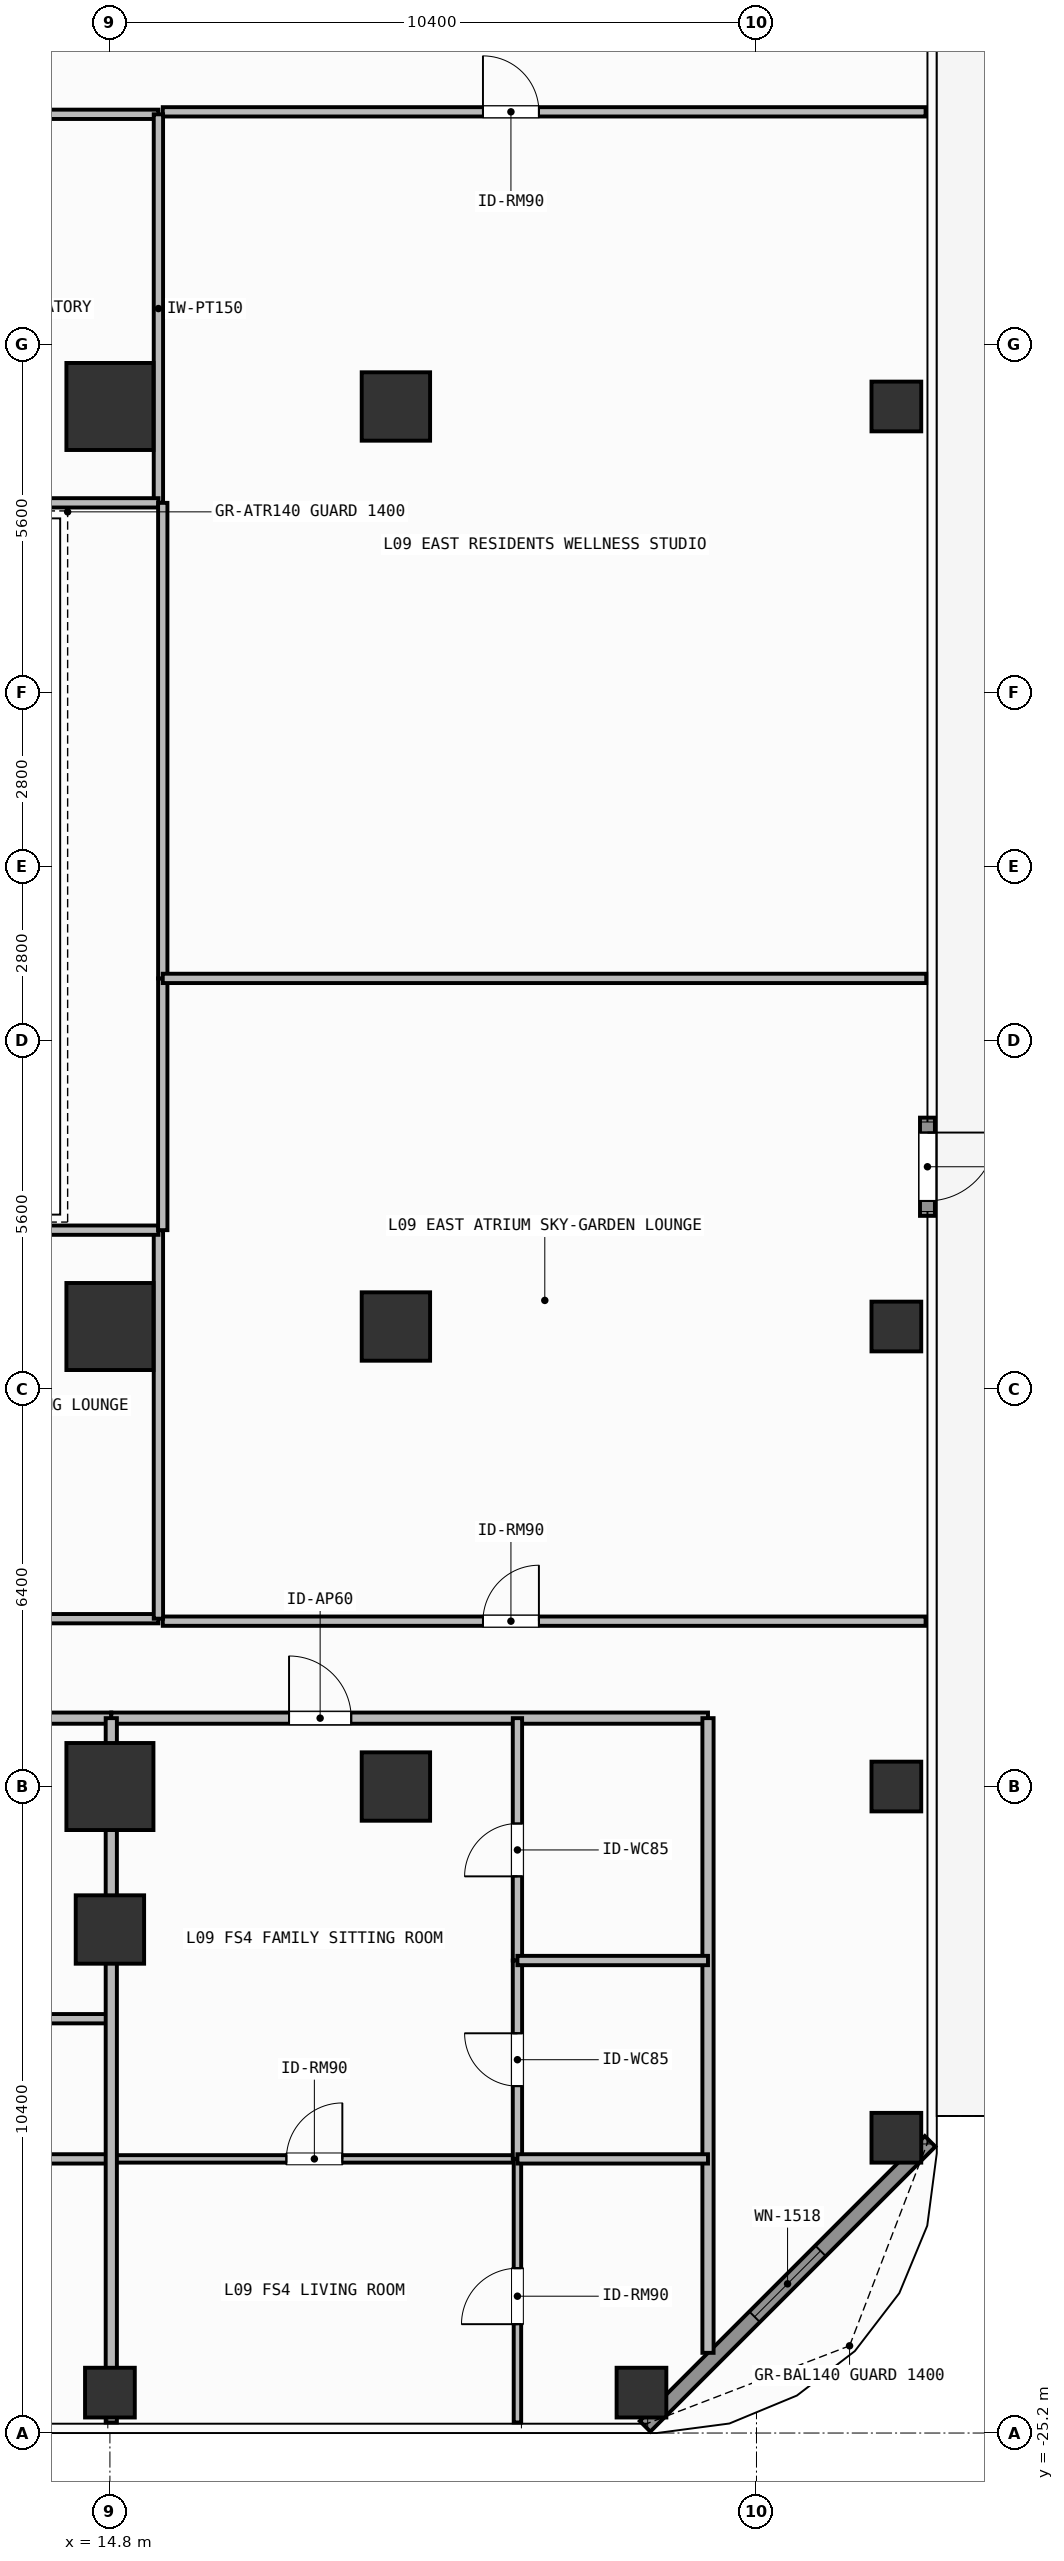
"""IFC4 building model, lengths in metres.
Left out: names, types, materials, properties, quantities, classifications, styles, units other than length and angle.
Written with IfcOpenShell. Run it as: python <this file> out.ifc"""

import sys

from ifc_helpers import new_model, si_unit, direction, frame, frame_2d, origin, origin_2d, place, context, subcontext, project, spatial, rectangle, hollow_rectangle, extrude, element, fill, save


model = new_model("IFC4")
c1 = context("Model", 3, precision=1e-05, world=origin(), true_north=direction((0.0, 1.0)))
c2 = subcontext(c1, "Body", "Model", "MODEL_VIEW")
j1 = project(units=[si_unit("LENGTHUNIT", "METRE"), si_unit("PLANEANGLEUNIT", "RADIAN")], contexts=[c1])
p1 = place(None, origin())
s1 = spatial("IfcSite", under=j1, at=p1, CompositionType="ELEMENT")
p2 = place(p1, origin())
s2 = spatial("IfcBuilding", under=s1, at=p2, CompositionType="ELEMENT")
p3 = place(p2, frame((0.0, 0.0, 34.5)))
s3 = spatial("IfcBuildingStorey", under=s2, at=p3, CompositionType="ELEMENT", Elevation=34.5)
for number, where, z_axis, x_axis in (
    (1, (14.8, -14.8, 0.0), (0.0, 0.0, 1.0), (1.0, 0.0, 0.0)),
    (2, (14.8, -7.4, 0.0), (0.0, 0.0, 1.0), (1.0, 0.0, 0.0)),
    (3, (14.8, 7.4, 0.0), (0.0, 0.0, 1.0), (1.0, 0.0, 0.0)),
):
    element("IfcColumn", number, at=place(p3, frame(where, z_axis=z_axis, x_axis=x_axis)), inside=s3, PredefinedType="COLUMN", context=c2, shape_type="SweptSolid", body=[
        extrude(rectangle(XDim=1.4, YDim=1.4, at=origin_2d()), origin(), (0.0, 0.0, 1.0), 3.9),
    ])
for number, where, z_axis, x_axis in (
    (4, (19.4, -14.8, 0.0), (0.0, 0.0, 1.0), (1.0, 0.0, 0.0)),
    (5, (19.4, -7.4, 0.0), (0.0, 0.0, 1.0), (1.0, 0.0, 0.0)),
    (6, (19.4, 7.4, 0.0), (0.0, 0.0, 1.0), (1.0, 0.0, 0.0)),
    (7, (14.8, -17.1, 0.0), (0.0, 0.0, 1.0), (1.0, 0.0, 0.0)),
):
    element("IfcColumn", number, at=place(p3, frame(where, z_axis=z_axis, x_axis=x_axis)), inside=s3, PredefinedType="COLUMN", context=c2, shape_type="SweptSolid", body=[
        extrude(rectangle(XDim=1.1, YDim=1.1, at=origin_2d()), origin(), (0.0, 0.0, 1.0), 3.9),
    ])
for number, where, z_axis, x_axis in (
    (8, (23.35, -24.55, 0.0), (0.0, 0.0, 1.0), (1.0, 0.0, 0.0)),
    (9, (27.45, -20.45, 0.0), (0.0, 0.0, 1.0), (1.0, 0.0, 0.0)),
    (10, (14.8, -24.55, 0.0), (0.0, 0.0, 1.0), (1.0, 0.0, 0.0)),
    (11, (27.45, -14.8, 0.0), (0.0, 0.0, 1.0), (1.0, 0.0, 0.0)),
    (12, (27.45, -7.4, 0.0), (0.0, 0.0, 1.0), (1.0, 0.0, 0.0)),
    (13, (27.45, 7.4, 0.0), (0.0, 0.0, 1.0), (1.0, 0.0, 0.0)),
):
    element("IfcColumn", number, at=place(p3, frame(where, z_axis=z_axis, x_axis=x_axis)), inside=s3, PredefinedType="COLUMN", context=c2, shape_type="SweptSolid", body=[
        extrude(hollow_rectangle(XDim=0.8, YDim=0.8, WallThickness=0.036, at=origin_2d()), origin(), (0.0, 0.0, 1.0), 3.9),
    ])
p4 = place(p3, frame((27.95, -4.04, 0.0), z_axis=(0.0, 0.0, 1.0), x_axis=(0.0, -1.0, 0.0)))
e14 = element("IfcWall", 14, at=p4, inside=s3, PredefinedType="SOLIDWALL", context=c2, shape_type="SweptSolid", body=[
    extrude(rectangle(XDim=1.58, YDim=0.24, at=frame_2d((0.79, 0.0))), origin(), (0.0, 0.0, 1.0), 3.68),
])
p5 = place(p4, frame((0.24, 0.0, 0.0)))
e15 = element("IfcOpeningElement", 15, at=p5, cuts=e14, PredefinedType="OPENING", context=c2, shape_type="SweptSolid", body=[
    extrude(rectangle(XDim=1.1, YDim=2.2, at=frame_2d((0.55, 1.1))), frame((0.0, 0.13, 0.0), z_axis=(0.0, -1.0, 0.0), x_axis=(1.0, 0.0, 0.0)), (0.0, 0.0, 1.0), 0.26),
])
p6 = place(p3, frame((27.992, -20.508, 0.0), z_axis=(0.0, 0.0, 1.0), x_axis=(-0.707106781187, -0.707106781187, 0.0)))
e16 = element("IfcWall", 16, at=p6, inside=s3, PredefinedType="SOLIDWALL", context=c2, shape_type="SweptSolid", body=[
    extrude(rectangle(XDim=6.484, YDim=0.24, at=frame_2d((3.242, 0.0))), origin(), (0.0, 0.0, 1.0), 3.68),
])
p7 = place(p6, frame((2.492, 0.0, 0.8)))
e17 = element("IfcOpeningElement", 17, at=p7, cuts=e16, PredefinedType="OPENING", context=c2, shape_type="SweptSolid", body=[
    extrude(rectangle(XDim=1.5, YDim=1.85, at=frame_2d((0.75, 0.925))), frame((0.0, 0.13, 0.0), z_axis=(0.0, -1.0, 0.0), x_axis=(1.0, 0.0, 0.0)), (0.0, 0.0, 1.0), 0.26),
])
p8 = place(p3, frame((10.1, -12.1, 0.0), z_axis=(0.0, 0.0, 1.0), x_axis=(1.0, 0.0, 0.0)))
e18 = element("IfcWall", 18, at=p8, inside=s3, PredefinedType="PARTITIONING", context=c2, shape_type="SweptSolid", body=[
    extrude(rectangle(XDim=5.48, YDim=0.15, at=frame_2d((2.74, 0.0))), origin(), (0.0, 0.0, 1.0), 3.68),
])
p9 = place(p8, frame((2.29, 0.0, 0.0)))
e19 = element("IfcOpeningElement", 19, at=p9, cuts=e18, PredefinedType="OPENING", context=c2, shape_type="SweptSolid", body=[
    extrude(rectangle(XDim=0.9, YDim=2.1, at=frame_2d((0.45, 1.05))), frame((0.0, 0.085, 0.0), z_axis=(0.0, -1.0, 0.0), x_axis=(1.0, 0.0, 0.0)), (0.0, 0.0, 1.0), 0.17),
])
p10 = place(p3, frame((8.36, 12.1, 0.0), z_axis=(0.0, 0.0, 1.0), x_axis=(1.0, 0.0, 0.0)))
e20 = element("IfcWall", 20, at=p10, inside=s3, PredefinedType="PARTITIONING", context=c2, shape_type="SweptSolid", body=[
    extrude(rectangle(XDim=7.22, YDim=0.15, at=frame_2d((3.61, 0.0))), origin(), (0.0, 0.0, 1.0), 3.68),
])
p11 = place(p10, frame((3.513, 0.0, 0.0)))
e21 = element("IfcOpeningElement", 21, at=p11, cuts=e20, PredefinedType="OPENING", context=c2, shape_type="SweptSolid", body=[
    extrude(rectangle(XDim=0.9, YDim=2.1, at=frame_2d((0.45, 1.05))), frame((0.0, 0.085, 0.0), z_axis=(0.0, -1.0, 0.0), x_axis=(1.0, 0.0, 0.0)), (0.0, 0.0, 1.0), 0.17),
])
p12 = place(p3, frame((2.9, -13.7, 0.0), z_axis=(0.0, 0.0, 1.0), x_axis=(1.0, 0.0, 0.0)))
e22 = element("IfcWall", 22, at=p12, inside=s3, PredefinedType="PARTITIONING", context=c2, shape_type="SweptSolid", body=[
    extrude(rectangle(XDim=11.922, YDim=0.18, at=frame_2d((5.961, 0.0))), origin(), (0.0, 0.0, 1.0), 3.68),
])
p13 = place(p12, frame((5.371, 0.0, 0.0)))
e23 = element("IfcOpeningElement", 23, at=p13, cuts=e22, PredefinedType="OPENING", context=c2, shape_type="SweptSolid", body=[
    extrude(rectangle(XDim=1.0, YDim=2.2, at=frame_2d((0.5, 1.1))), frame((0.0, 0.1, 0.0), z_axis=(0.0, -1.0, 0.0), x_axis=(1.0, 0.0, 0.0)), (0.0, 0.0, 1.0), 0.2),
])
p14 = place(p3, frame((14.822, -13.7, 0.0), z_axis=(0.0, 0.0, 1.0), x_axis=(1.0, 0.0, 0.0)))
e24 = element("IfcWall", 24, at=p14, inside=s3, PredefinedType="PARTITIONING", context=c2, shape_type="SweptSolid", body=[
    extrude(rectangle(XDim=9.598, YDim=0.18, at=frame_2d((4.799, 0.0))), origin(), (0.0, 0.0, 1.0), 3.68),
])
p15 = place(p14, frame((2.859, 0.0, 0.0)))
e25 = element("IfcOpeningElement", 25, at=p15, cuts=e24, PredefinedType="OPENING", context=c2, shape_type="SweptSolid", body=[
    extrude(rectangle(XDim=1.0, YDim=2.2, at=frame_2d((0.5, 1.1))), frame((0.0, 0.1, 0.0), z_axis=(0.0, -1.0, 0.0), x_axis=(1.0, 0.0, 0.0)), (0.0, 0.0, 1.0), 0.2),
])
p16 = place(p3, frame((14.822, -20.79, 0.0), z_axis=(0.0, 0.0, 1.0), x_axis=(1.0, 0.0, 0.0)))
e26 = element("IfcWall", 26, at=p16, inside=s3, PredefinedType="PARTITIONING", context=c2, shape_type="SweptSolid", body=[
    extrude(rectangle(XDim=6.533, YDim=0.12, at=frame_2d((3.267, 0.0))), origin(), (0.0, 0.0, 1.0), 3.68),
])
p17 = place(p16, frame((2.816, 0.0, 0.0)))
e27 = element("IfcOpeningElement", 27, at=p17, cuts=e26, PredefinedType="OPENING", context=c2, shape_type="SweptSolid", body=[
    extrude(rectangle(XDim=0.9, YDim=2.1, at=frame_2d((0.45, 1.05))), frame((0.0, 0.07, 0.0), z_axis=(0.0, -1.0, 0.0), x_axis=(1.0, 0.0, 0.0)), (0.0, 0.0, 1.0), 0.14),
])
p18 = place(p3, frame((21.355, -17.599, 0.0), z_axis=(0.0, 0.0, 1.0), x_axis=(0.0, 1.0, 0.0)))
e28 = element("IfcWall", 28, at=p18, inside=s3, PredefinedType="PARTITIONING", context=c2, shape_type="SweptSolid", body=[
    extrude(rectangle(XDim=3.899, YDim=0.15, at=frame_2d((1.95, 0.0))), origin(), (0.0, 0.0, 1.0), 3.68),
])
p19 = place(p18, frame((1.354, 0.0, 0.0)))
e29 = element("IfcOpeningElement", 29, at=p19, cuts=e28, PredefinedType="OPENING", context=c2, shape_type="SweptSolid", body=[
    extrude(rectangle(XDim=0.85, YDim=2.1, at=frame_2d((0.425, 1.05))), frame((0.0, 0.085, 0.0), z_axis=(0.0, -1.0, 0.0), x_axis=(1.0, 0.0, 0.0)), (0.0, 0.0, 1.0), 0.17),
])
p20 = place(p3, frame((21.355, -20.79, 0.0), z_axis=(0.0, 0.0, 1.0), x_axis=(0.0, 1.0, 0.0)))
e30 = element("IfcWall", 30, at=p20, inside=s3, PredefinedType="PARTITIONING", context=c2, shape_type="SweptSolid", body=[
    extrude(rectangle(XDim=3.191, YDim=0.15, at=frame_2d((1.595, 0.0))), origin(), (0.0, 0.0, 1.0), 3.68),
])
p21 = place(p20, frame((1.17, 0.0, 0.0)))
e31 = element("IfcOpeningElement", 31, at=p21, cuts=e30, PredefinedType="OPENING", context=c2, shape_type="SweptSolid", body=[
    extrude(rectangle(XDim=0.85, YDim=2.1, at=frame_2d((0.425, 1.05))), frame((0.0, 0.085, 0.0), z_axis=(0.0, -1.0, 0.0), x_axis=(1.0, 0.0, 0.0)), (0.0, 0.0, 1.0), 0.17),
])
p22 = place(p3, frame((21.355, -25.03, 0.0), z_axis=(0.0, 0.0, 1.0), x_axis=(0.0, 1.0, 0.0)))
e32 = element("IfcWall", 32, at=p22, inside=s3, PredefinedType="PARTITIONING", context=c2, shape_type="SweptSolid", body=[
    extrude(rectangle(XDim=4.24, YDim=0.12, at=frame_2d((2.12, 0.0))), origin(), (0.0, 0.0, 1.0), 3.68),
])
p23 = place(p22, frame((1.581, 0.0, 0.0)))
e33 = element("IfcOpeningElement", 33, at=p23, cuts=e32, PredefinedType="OPENING", context=c2, shape_type="SweptSolid", body=[
    extrude(rectangle(XDim=0.9, YDim=2.1, at=frame_2d((0.45, 1.05))), frame((0.0, 0.07, 0.0), z_axis=(0.0, -1.0, 0.0), x_axis=(1.0, 0.0, 0.0)), (0.0, 0.0, 1.0), 0.14),
])
p24 = place(p3, frame((15.65, -12.14, 0.0), z_axis=(0.0, 0.0, 1.0), x_axis=(1.0, 0.0, 0.0)))
e34 = element("IfcWall", 34, at=p24, inside=s3, PredefinedType="PARTITIONING", context=c2, shape_type="SweptSolid", body=[
    extrude(rectangle(XDim=12.27, YDim=0.15, at=frame_2d((6.135, 0.0))), origin(), (0.0, 0.0, 1.0), 3.68),
])
p25 = place(p24, frame((5.15, 0.0, 0.0)))
e35 = element("IfcOpeningElement", 35, at=p25, cuts=e34, PredefinedType="OPENING", context=c2, shape_type="SweptSolid", body=[
    extrude(rectangle(XDim=0.9, YDim=2.1, at=frame_2d((0.45, 1.05))), frame((0.0, 0.085, 0.0), z_axis=(0.0, -1.0, 0.0), x_axis=(1.0, 0.0, 0.0)), (0.0, 0.0, 1.0), 0.17),
])
p26 = place(p3, frame((15.65, 12.14, 0.0), z_axis=(0.0, 0.0, 1.0), x_axis=(1.0, 0.0, 0.0)))
e36 = element("IfcWall", 36, at=p26, inside=s3, PredefinedType="PARTITIONING", context=c2, shape_type="SweptSolid", body=[
    extrude(rectangle(XDim=12.27, YDim=0.15, at=frame_2d((6.135, 0.0))), origin(), (0.0, 0.0, 1.0), 3.68),
])
p27 = place(p26, frame((5.15, 0.0, 0.0)))
e37 = element("IfcOpeningElement", 37, at=p27, cuts=e36, PredefinedType="OPENING", context=c2, shape_type="SweptSolid", body=[
    extrude(rectangle(XDim=0.9, YDim=2.1, at=frame_2d((0.45, 1.05))), frame((0.0, 0.085, 0.0), z_axis=(0.0, -1.0, 0.0), x_axis=(1.0, 0.0, 0.0)), (0.0, 0.0, 1.0), 0.17),
])
p28 = place(p3, frame((15.58, -12.1, 0.0), z_axis=(0.0, 0.0, 1.0), x_axis=(0.0, 1.0, 0.0)))
e38 = element("IfcWall", 38, at=p28, inside=s3, PredefinedType="PARTITIONING", context=c2, shape_type="SweptSolid", body=[
    extrude(rectangle(XDim=6.25, YDim=0.15, at=frame_2d((3.125, 0.0))), origin(), (0.0, 0.0, 1.0), 3.68),
])
p29 = place(p3, frame((8.96, -5.85, 0.0), z_axis=(0.0, 0.0, 1.0), x_axis=(1.0, 0.0, 0.0)))
e39 = element("IfcWall", 39, at=p29, inside=s3, PredefinedType="PARTITIONING", context=c2, shape_type="SweptSolid", body=[
    extrude(rectangle(XDim=6.62, YDim=0.15, at=frame_2d((3.31, 0.0))), origin(), (0.0, 0.0, 1.0), 3.68),
])
p30 = place(p3, frame((15.58, 5.85, 0.0), z_axis=(0.0, 0.0, 1.0), x_axis=(0.0, 1.0, 0.0)))
e40 = element("IfcWall", 40, at=p30, inside=s3, PredefinedType="PARTITIONING", context=c2, shape_type="SweptSolid", body=[
    extrude(rectangle(XDim=6.25, YDim=0.15, at=frame_2d((3.125, 0.0))), origin(), (0.0, 0.0, 1.0), 3.68),
])
p31 = place(p3, frame((8.96, 5.85, 0.0), z_axis=(0.0, 0.0, 1.0), x_axis=(1.0, 0.0, 0.0)))
e41 = element("IfcWall", 41, at=p31, inside=s3, PredefinedType="PARTITIONING", context=c2, shape_type="SweptSolid", body=[
    extrude(rectangle(XDim=6.62, YDim=0.15, at=frame_2d((3.31, 0.0))), origin(), (0.0, 0.0, 1.0), 3.68),
])
p32 = place(p3, frame((24.42, -23.91, 0.0), z_axis=(0.0, 0.0, 1.0), x_axis=(0.0, 1.0, 0.0)))
e42 = element("IfcWall", 42, at=p32, inside=s3, PredefinedType="PARTITIONING", context=c2, shape_type="SweptSolid", body=[
    extrude(rectangle(XDim=10.21, YDim=0.18, at=frame_2d((5.105, 0.0))), origin(), (0.0, 0.0, 1.0), 3.68),
])
for number, where, z_axis, x_axis in (
    (43, (11.102, -18.535, 0.0), (0.0, 0.0, 1.0), (1.0, 0.0, 0.0)),
    (44, (11.102, -20.79, 0.0), (0.0, 0.0, 1.0), (1.0, 0.0, 0.0)),
):
    element("IfcWall", number, at=place(p3, frame(where, z_axis=z_axis, x_axis=x_axis)), inside=s3, PredefinedType="PARTITIONING", context=c2, shape_type="SweptSolid", body=[
        extrude(rectangle(XDim=3.72, YDim=0.15, at=frame_2d((1.86, 0.0))), origin(), (0.0, 0.0, 1.0), 3.68),
    ])
for number, where, z_axis, x_axis in (
    (45, (21.355, -17.599, 0.0), (0.0, 0.0, 1.0), (1.0, 0.0, 0.0)),
    (46, (21.355, -20.79, 0.0), (0.0, 0.0, 1.0), (1.0, 0.0, 0.0)),
):
    element("IfcWall", number, at=place(p3, frame(where, z_axis=z_axis, x_axis=x_axis)), inside=s3, PredefinedType="PARTITIONING", context=c2, shape_type="SweptSolid", body=[
        extrude(rectangle(XDim=3.065, YDim=0.15, at=frame_2d((1.532, 0.0))), origin(), (0.0, 0.0, 1.0), 3.68),
    ])
p33 = place(p3, frame((14.822, -25.03, 0.0), z_axis=(0.0, 0.0, 1.0), x_axis=(0.0, 1.0, 0.0)))
e47 = element("IfcWall", 47, at=p33, inside=s3, PredefinedType="PARTITIONING", context=c2, shape_type="SweptSolid", body=[
    extrude(rectangle(XDim=11.33, YDim=0.18, at=frame_2d((5.665, 0.0))), origin(), (0.0, 0.0, 1.0), 3.082),
])
p34 = place(p3, frame((15.65, -5.85, 0.0), z_axis=(0.0, 0.0, 1.0), x_axis=(0.0, 1.0, 0.0)))
e48 = element("IfcWall", 48, at=p34, inside=s3, PredefinedType="PARTITIONING", context=c2, shape_type="SweptSolid", body=[
    extrude(rectangle(XDim=4.05, YDim=0.15, at=frame_2d((2.025, 0.0))), origin(), (0.0, 0.0, 1.0), 3.68),
])
p35 = place(p3, frame((15.65, -1.8, 0.0), z_axis=(0.0, 0.0, 1.0), x_axis=(0.0, 1.0, 0.0)))
e49 = element("IfcWall", 49, at=p35, inside=s3, PredefinedType="PARTITIONING", context=c2, shape_type="SweptSolid", body=[
    extrude(rectangle(XDim=7.65, YDim=0.15, at=frame_2d((3.825, 0.0))), origin(), (0.0, 0.0, 1.0), 3.68),
])
p36 = place(p3, frame((15.65, -1.8, 0.0), z_axis=(0.0, 0.0, 1.0), x_axis=(1.0, 0.0, 0.0)))
e50 = element("IfcWall", 50, at=p36, inside=s3, PredefinedType="PARTITIONING", context=c2, shape_type="SweptSolid", body=[
    extrude(rectangle(XDim=12.28, YDim=0.15, at=frame_2d((6.14, 0.0))), origin(), (0.0, 0.0, 1.0), 3.68),
])
p37 = place(p5, origin())
e51 = element("IfcDoor", 51, at=p37, inside=s3, OperationType="SINGLE_SWING_LEFT", PredefinedType="DOOR", context=c2, shape_type="SweptSolid", body=[
    extrude(rectangle(XDim=1.1, YDim=2.2, at=frame_2d((0.55, 1.1))), frame((0.0, 0.025, 0.0), z_axis=(0.0, -1.0, 0.0), x_axis=(1.0, 0.0, 0.0)), (0.0, 0.0, 1.0), 0.05),
])
fill(e15, e51)
p38 = place(p7, origin())
e52 = element("IfcWindow", 52, at=p38, inside=s3, PartitioningType="SINGLE_PANEL", PredefinedType="WINDOW", context=c2, shape_type="SweptSolid", body=[
    extrude(rectangle(XDim=1.5, YDim=1.85, at=frame_2d((0.75, 0.925))), frame((0.0, 0.03, 0.0), z_axis=(0.0, -1.0, 0.0), x_axis=(1.0, 0.0, 0.0)), (0.0, 0.0, 1.0), 0.06),
])
fill(e17, e52)
p39 = place(p15, origin())
e53 = element("IfcDoor", 53, at=p39, inside=s3, OperationType="SINGLE_SWING_LEFT", PredefinedType="DOOR", context=c2, shape_type="SweptSolid", body=[
    extrude(rectangle(XDim=1.0, YDim=2.2, at=frame_2d((0.5, 1.1))), frame((0.0, 0.025, 0.0), z_axis=(0.0, -1.0, 0.0), x_axis=(1.0, 0.0, 0.0)), (0.0, 0.0, 1.0), 0.05),
])
fill(e25, e53)
p40 = place(p17, origin())
e54 = element("IfcDoor", 54, at=p40, inside=s3, OperationType="SINGLE_SWING_RIGHT", PredefinedType="DOOR", context=c2, shape_type="SweptSolid", body=[
    extrude(rectangle(XDim=0.9, YDim=2.1, at=frame_2d((0.45, 1.05))), frame((0.0, 0.025, 0.0), z_axis=(0.0, -1.0, 0.0), x_axis=(1.0, 0.0, 0.0)), (0.0, 0.0, 1.0), 0.05),
])
fill(e27, e54)
p41 = place(p19, origin())
e55 = element("IfcDoor", 55, at=p41, inside=s3, OperationType="SINGLE_SWING_LEFT", PredefinedType="DOOR", context=c2, shape_type="SweptSolid", body=[
    extrude(rectangle(XDim=0.85, YDim=2.1, at=frame_2d((0.425, 1.05))), frame((0.0, 0.025, 0.0), z_axis=(0.0, -1.0, 0.0), x_axis=(1.0, 0.0, 0.0)), (0.0, 0.0, 1.0), 0.05),
])
fill(e29, e55)
p42 = place(p21, origin())
e56 = element("IfcDoor", 56, at=p42, inside=s3, OperationType="SINGLE_SWING_RIGHT", PredefinedType="DOOR", context=c2, shape_type="SweptSolid", body=[
    extrude(rectangle(XDim=0.85, YDim=2.1, at=frame_2d((0.425, 1.05))), frame((0.0, 0.025, 0.0), z_axis=(0.0, -1.0, 0.0), x_axis=(1.0, 0.0, 0.0)), (0.0, 0.0, 1.0), 0.05),
])
fill(e31, e56)
p43 = place(p23, origin())
e57 = element("IfcDoor", 57, at=p43, inside=s3, OperationType="SINGLE_SWING_LEFT", PredefinedType="DOOR", context=c2, shape_type="SweptSolid", body=[
    extrude(rectangle(XDim=0.9, YDim=2.1, at=frame_2d((0.45, 1.05))), frame((0.0, 0.025, 0.0), z_axis=(0.0, -1.0, 0.0), x_axis=(1.0, 0.0, 0.0)), (0.0, 0.0, 1.0), 0.05),
])
fill(e33, e57)
p44 = place(p25, origin())
e58 = element("IfcDoor", 58, at=p44, inside=s3, OperationType="SINGLE_SWING_RIGHT", PredefinedType="DOOR", context=c2, shape_type="SweptSolid", body=[
    extrude(rectangle(XDim=0.9, YDim=2.1, at=frame_2d((0.45, 1.05))), frame((0.0, 0.025, 0.0), z_axis=(0.0, -1.0, 0.0), x_axis=(1.0, 0.0, 0.0)), (0.0, 0.0, 1.0), 0.05),
])
fill(e35, e58)
p45 = place(p27, origin())
e59 = element("IfcDoor", 59, at=p45, inside=s3, OperationType="SINGLE_SWING_LEFT", PredefinedType="DOOR", context=c2, shape_type="SweptSolid", body=[
    extrude(rectangle(XDim=0.9, YDim=2.1, at=frame_2d((0.45, 1.05))), frame((0.0, 0.025, 0.0), z_axis=(0.0, -1.0, 0.0), x_axis=(1.0, 0.0, 0.0)), (0.0, 0.0, 1.0), 0.05),
])
fill(e37, e59)
save(model, sys.argv[1])
